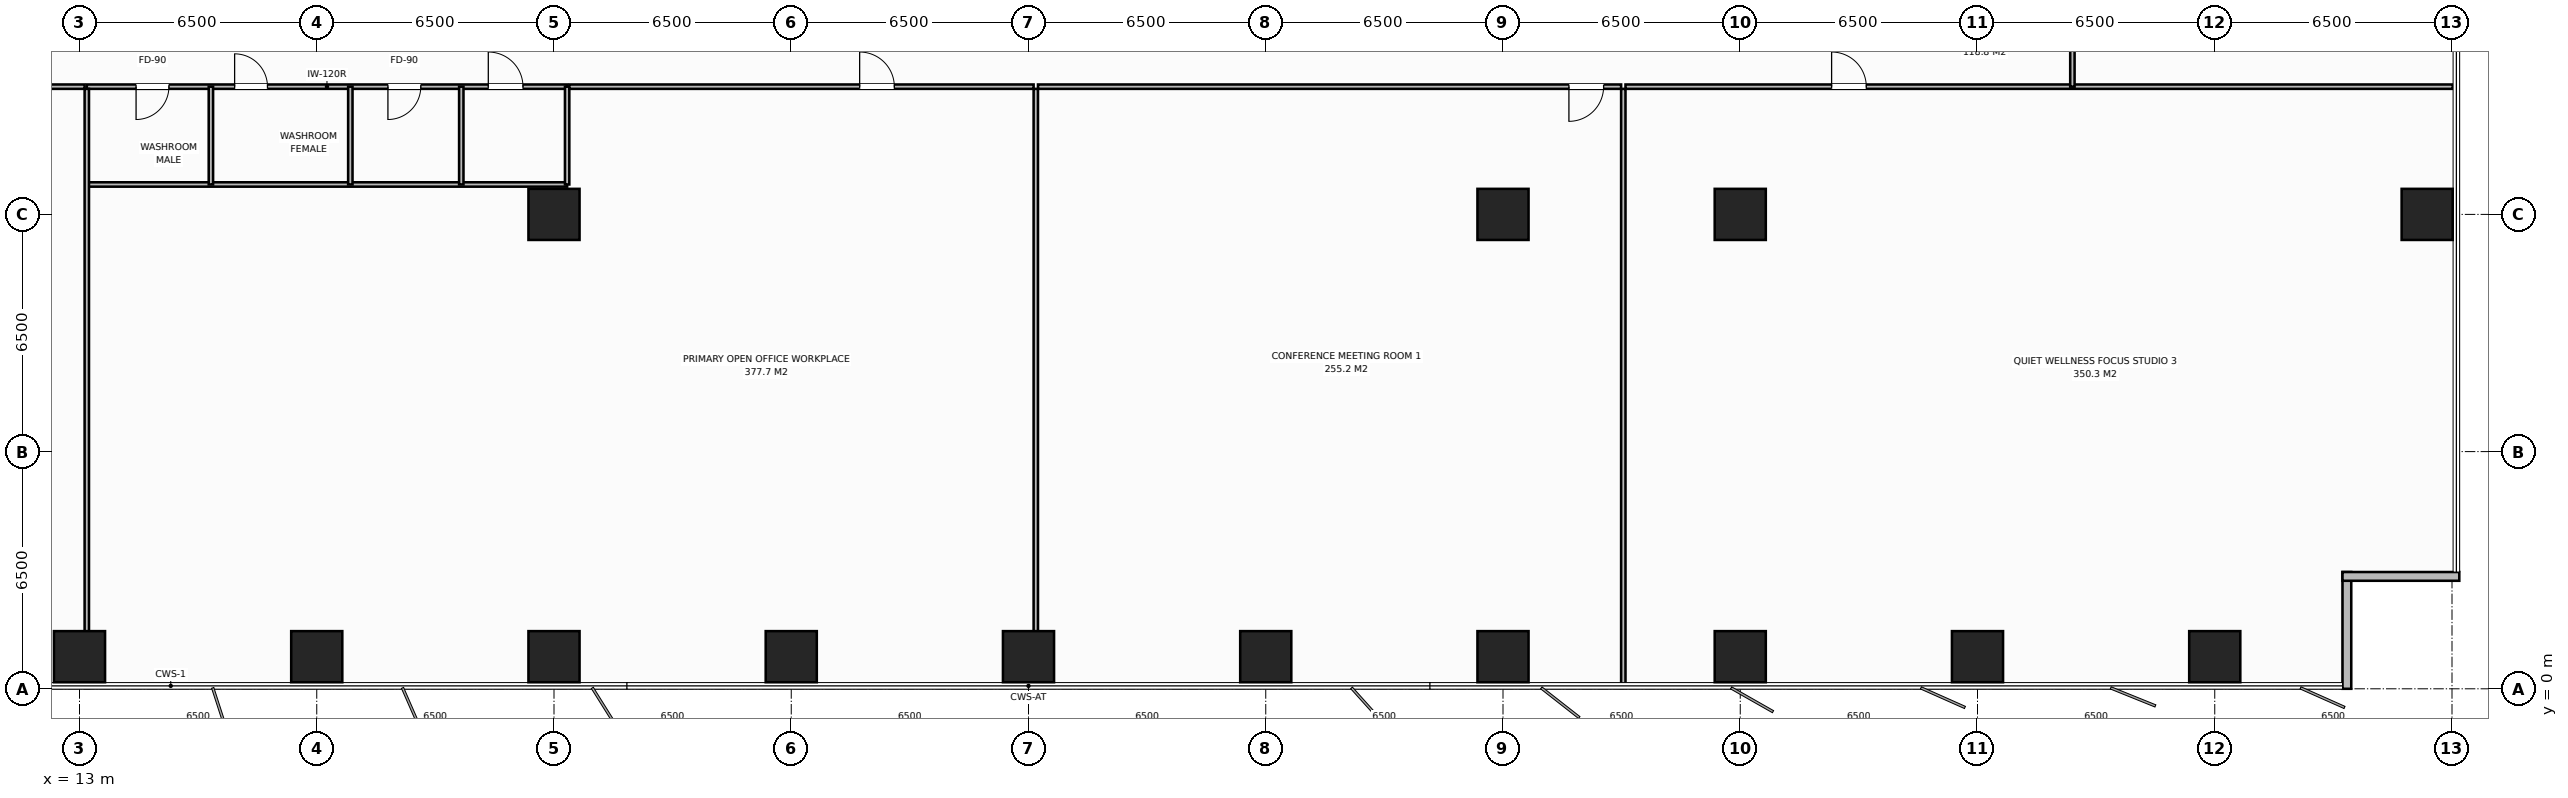
"""IFC4 building model, lengths in metres.
Left out: names, types, materials, properties, quantities, classifications, styles, units other than length and angle.
Written with IfcOpenShell. Run it as: python <this file> out.ifc"""

import sys

from ifc_helpers import new_model, si_unit, direction, frame, frame_2d, origin, origin_2d, place, context, subcontext, project, spatial, rectangle, extrude, element, fill, save


model = new_model("IFC4")
c1 = context("Model", 3, precision=1e-05, world=origin(), true_north=direction((0.0, 1.0)))
c2 = subcontext(c1, "Body", "Model", "MODEL_VIEW")
j1 = project(units=[si_unit("LENGTHUNIT", "METRE"), si_unit("PLANEANGLEUNIT", "RADIAN")], contexts=[c1])
p1 = place(None, origin())
s1 = spatial("IfcSite", under=j1, at=p1, CompositionType="ELEMENT")
p2 = place(p1, origin())
s2 = spatial("IfcBuilding", under=s1, at=p2, CompositionType="ELEMENT")
p3 = place(p2, frame((0.0, 0.0, 39.2)))
s3 = spatial("IfcBuildingStorey", under=s2, at=p3, CompositionType="ELEMENT", Elevation=39.2)
for number, where, z_axis, x_axis in (
    (1, (58.5, 13.0, 0.0), (0.0, 0.0, 1.0), (1.0, 0.0, 0.0)),
    (2, (26.0, 13.0, 0.0), (0.0, 0.0, 1.0), (1.0, 0.0, 0.0)),
    (3, (52.0, 13.0, 0.0), (0.0, 0.0, 1.0), (1.0, 0.0, 0.0)),
    (4, (13.0, 0.88, 0.0), (0.0, 0.0, 1.0), (1.0, 0.0, 0.0)),
    (5, (19.5, 0.88, 0.0), (0.0, 0.0, 1.0), (1.0, 0.0, 0.0)),
    (6, (26.0, 0.88, 0.0), (0.0, 0.0, 1.0), (1.0, 0.0, 0.0)),
    (7, (32.5, 0.88, 0.0), (0.0, 0.0, 1.0), (1.0, 0.0, 0.0)),
    (8, (39.0, 0.88, 0.0), (0.0, 0.0, 1.0), (1.0, 0.0, 0.0)),
    (9, (45.5, 0.88, 0.0), (0.0, 0.0, 1.0), (1.0, 0.0, 0.0)),
    (10, (52.0, 0.88, 0.0), (0.0, 0.0, 1.0), (1.0, 0.0, 0.0)),
    (11, (58.5, 0.88, 0.0), (0.0, 0.0, 1.0), (1.0, 0.0, 0.0)),
    (12, (65.0, 0.88, 0.0), (0.0, 0.0, 1.0), (1.0, 0.0, 0.0)),
    (13, (71.5, 0.88, 0.0), (0.0, 0.0, 1.0), (1.0, 0.0, 0.0)),
    (14, (77.32, 13.0, 0.0), (0.0, 0.0, 1.0), (1.0, 0.0, 0.0)),
):
    element("IfcColumn", number, at=place(p3, frame(where, z_axis=z_axis, x_axis=x_axis)), inside=s3, PredefinedType="COLUMN", context=c2, shape_type="SweptSolid", body=[
        extrude(rectangle(XDim=1.4, YDim=1.4, at=origin_2d()), origin(), (0.0, 0.0, 1.0), 3.8),
    ])
for number, where, z_axis, x_axis in (
    (15, (75.12, 3.2, 0.0), (0.0, 0.0, 1.0), (0.0, -1.0, 0.0)),
    (16, (78.2, 3.08, 0.0), (0.0, 0.0, 1.0), (-1.0, 0.0, 0.0)),
):
    element("IfcWall", number, at=place(p3, frame(where, z_axis=z_axis, x_axis=x_axis)), inside=s3, PredefinedType="STANDARD", context=c2, shape_type="SweptSolid", body=[
        extrude(rectangle(XDim=3.2, YDim=0.24, at=frame_2d((1.6, 0.0))), origin(), (0.0, 0.0, 1.0), 3.55),
    ])
p4 = place(p3, frame((13.2, 16.5, 0.0), z_axis=(0.0, 0.0, 1.0), x_axis=(1.0, 0.0, 0.0)))
e17 = element("IfcWall", 17, at=p4, inside=s3, PredefinedType="PARTITIONING", context=c2, shape_type="SweptSolid", body=[
    extrude(rectangle(XDim=13.16, YDim=0.12, at=frame_2d((6.58, 0.0))), origin(), (0.0, 0.0, 1.0), 3.55),
])
p5 = place(p4, frame((1.35, 0.0, 0.0)))
e18 = element("IfcOpeningElement", 18, at=p5, cuts=e17, PredefinedType="OPENING", context=c2, shape_type="SweptSolid", body=[
    extrude(rectangle(XDim=0.9, YDim=2.15, at=frame_2d((0.45, 1.075))), frame((0.0, 0.07, 0.0), z_axis=(0.0, -1.0, 0.0), x_axis=(1.0, 0.0, 0.0)), (0.0, 0.0, 1.0), 0.14),
])
p6 = place(p4, frame((4.05, 0.0, 0.0)))
e19 = element("IfcOpeningElement", 19, at=p6, cuts=e17, PredefinedType="OPENING", context=c2, shape_type="SweptSolid", body=[
    extrude(rectangle(XDim=0.9, YDim=2.15, at=frame_2d((0.45, 1.075))), frame((0.0, 0.07, 0.0), z_axis=(0.0, -1.0, 0.0), x_axis=(1.0, 0.0, 0.0)), (0.0, 0.0, 1.0), 0.14),
])
p7 = place(p4, frame((8.25, 0.0, 0.0)))
e20 = element("IfcOpeningElement", 20, at=p7, cuts=e17, PredefinedType="OPENING", context=c2, shape_type="SweptSolid", body=[
    extrude(rectangle(XDim=0.9, YDim=2.15, at=frame_2d((0.45, 1.075))), frame((0.0, 0.07, 0.0), z_axis=(0.0, -1.0, 0.0), x_axis=(1.0, 0.0, 0.0)), (0.0, 0.0, 1.0), 0.14),
])
p8 = place(p4, frame((11.0, 0.0, 0.0)))
e21 = element("IfcOpeningElement", 21, at=p8, cuts=e17, PredefinedType="OPENING", context=c2, shape_type="SweptSolid", body=[
    extrude(rectangle(XDim=0.95, YDim=2.15, at=frame_2d((0.475, 1.075))), frame((0.0, 0.07, 0.0), z_axis=(0.0, -1.0, 0.0), x_axis=(1.0, 0.0, 0.0)), (0.0, 0.0, 1.0), 0.14),
])
p9 = place(p3, frame((13.2, 13.82, 0.0), z_axis=(0.0, 0.0, 1.0), x_axis=(1.0, 0.0, 0.0)))
e22 = element("IfcWall", 22, at=p9, inside=s3, PredefinedType="PARTITIONING", context=c2, shape_type="SweptSolid", body=[
    extrude(rectangle(XDim=13.16, YDim=0.12, at=frame_2d((6.58, 0.0))), origin(), (0.0, 0.0, 1.0), 3.55),
])
for number, where, z_axis, x_axis in (
    (23, (16.6, 13.82, 0.0), (0.0, 0.0, 1.0), (0.0, 1.0, 0.0)),
    (24, (20.42, 13.82, 0.0), (0.0, 0.0, 1.0), (0.0, 1.0, 0.0)),
    (25, (23.46, 13.82, 0.0), (0.0, 0.0, 1.0), (0.0, 1.0, 0.0)),
    (26, (26.36, 13.82, 0.0), (0.0, 0.0, 1.0), (0.0, 1.0, 0.0)),
):
    element("IfcWall", number, at=place(p3, frame(where, z_axis=z_axis, x_axis=x_axis)), inside=s3, PredefinedType="PARTITIONING", context=c2, shape_type="SweptSolid", body=[
        extrude(rectangle(XDim=2.68, YDim=0.12, at=frame_2d((1.34, 0.0))), origin(), (0.0, 0.0, 1.0), 3.55),
    ])
p10 = place(p3, frame((13.2, 0.02, 0.0), z_axis=(0.0, 0.0, 1.0), x_axis=(0.0, 1.0, 0.0)))
e27 = element("IfcWall", 27, at=p10, inside=s3, PredefinedType="PARTITIONING", context=c2, shape_type="SweptSolid", body=[
    extrude(rectangle(XDim=16.42, YDim=0.12, at=frame_2d((8.21, 0.0))), origin(), (0.0, 0.0, 1.0), 2.9),
])
p11 = place(p3, frame((-0.02, 16.5, 0.0), z_axis=(0.0, 0.0, 1.0), x_axis=(1.0, 0.0, 0.0)))
e28 = element("IfcWall", 28, at=p11, inside=s3, PredefinedType="PARTITIONING", context=c2, shape_type="SweptSolid", body=[
    extrude(rectangle(XDim=13.16, YDim=0.12, at=frame_2d((6.58, 0.0))), origin(), (0.0, 0.0, 1.0), 3.55),
])
p12 = place(p11, frame((10.9, 0.0, 0.0)))
e29 = element("IfcOpeningElement", 29, at=p12, cuts=e28, PredefinedType="OPENING", context=c2, shape_type="SweptSolid", body=[
    extrude(rectangle(XDim=0.95, YDim=2.15, at=frame_2d((0.475, 1.075))), frame((0.0, 0.07, 0.0), z_axis=(0.0, -1.0, 0.0), x_axis=(1.0, 0.0, 0.0)), (0.0, 0.0, 1.0), 0.14),
])
p13 = place(p3, frame((39.2, 0.02, 0.0), z_axis=(0.0, 0.0, 1.0), x_axis=(0.0, 1.0, 0.0)))
e30 = element("IfcWall", 30, at=p13, inside=s3, PredefinedType="PARTITIONING", context=c2, shape_type="SweptSolid", body=[
    extrude(rectangle(XDim=16.42, YDim=0.12, at=frame_2d((8.21, 0.0))), origin(), (0.0, 0.0, 1.0), 2.9),
])
p14 = place(p3, frame((26.42, 16.5, 0.0), z_axis=(0.0, 0.0, 1.0), x_axis=(1.0, 0.0, 0.0)))
e31 = element("IfcWall", 31, at=p14, inside=s3, PredefinedType="PARTITIONING", context=c2, shape_type="SweptSolid", body=[
    extrude(rectangle(XDim=12.72, YDim=0.12, at=frame_2d((6.36, 0.0))), origin(), (0.0, 0.0, 1.0), 3.55),
])
p15 = place(p14, frame((7.954, 0.0, 0.0)))
e32 = element("IfcOpeningElement", 32, at=p15, cuts=e31, PredefinedType="OPENING", context=c2, shape_type="SweptSolid", body=[
    extrude(rectangle(XDim=0.95, YDim=2.15, at=frame_2d((0.475, 1.075))), frame((0.0, 0.07, 0.0), z_axis=(0.0, -1.0, 0.0), x_axis=(1.0, 0.0, 0.0)), (0.0, 0.0, 1.0), 0.14),
])
p16 = place(p3, frame((55.296, 0.02, 0.0), z_axis=(0.0, 0.0, 1.0), x_axis=(0.0, 1.0, 0.0)))
e33 = element("IfcWall", 33, at=p16, inside=s3, PredefinedType="PARTITIONING", context=c2, shape_type="SweptSolid", body=[
    extrude(rectangle(XDim=16.42, YDim=0.12, at=frame_2d((8.21, 0.0))), origin(), (0.0, 0.0, 1.0), 3.55),
])
p17 = place(p3, frame((39.26, 16.5, 0.0), z_axis=(0.0, 0.0, 1.0), x_axis=(1.0, 0.0, 0.0)))
e34 = element("IfcWall", 34, at=p17, inside=s3, PredefinedType="PARTITIONING", context=c2, shape_type="SweptSolid", body=[
    extrude(rectangle(XDim=15.976, YDim=0.12, at=frame_2d((7.988, 0.0))), origin(), (0.0, 0.0, 1.0), 3.55),
])
p18 = place(p17, frame((14.546, 0.0, 0.0)))
e35 = element("IfcOpeningElement", 35, at=p18, cuts=e34, PredefinedType="OPENING", context=c2, shape_type="SweptSolid", body=[
    extrude(rectangle(XDim=0.95, YDim=2.15, at=frame_2d((0.475, 1.075))), frame((0.0, 0.07, 0.0), z_axis=(0.0, -1.0, 0.0), x_axis=(1.0, 0.0, 0.0)), (0.0, 0.0, 1.0), 0.14),
])
p19 = place(p3, frame((55.356, 16.5, 0.0), z_axis=(0.0, 0.0, 1.0), x_axis=(1.0, 0.0, 0.0)))
e36 = element("IfcWall", 36, at=p19, inside=s3, PredefinedType="PARTITIONING", context=c2, shape_type="SweptSolid", body=[
    extrude(rectangle(XDim=22.664, YDim=0.12, at=frame_2d((11.332, 0.0))), origin(), (0.0, 0.0, 1.0), 3.55),
])
p20 = place(p19, frame((5.647, 0.0, 0.0)))
e37 = element("IfcOpeningElement", 37, at=p20, cuts=e36, PredefinedType="OPENING", context=c2, shape_type="SweptSolid", body=[
    extrude(rectangle(XDim=0.95, YDim=2.15, at=frame_2d((0.475, 1.075))), frame((0.0, 0.07, 0.0), z_axis=(0.0, -1.0, 0.0), x_axis=(1.0, 0.0, 0.0)), (0.0, 0.0, 1.0), 0.14),
])
p21 = place(p3, frame((67.6, 16.5, 0.0), z_axis=(0.0, 0.0, 1.0), x_axis=(0.0, 1.0, 0.0)))
e38 = element("IfcWall", 38, at=p21, inside=s3, PredefinedType="PARTITIONING", context=c2, shape_type="SweptSolid", body=[
    extrude(rectangle(XDim=19.0, YDim=0.12, at=frame_2d((9.5, 0.0))), origin(), (0.0, 0.0, 1.0), 3.55),
])
p22 = place(p21, frame((9.025, 0.0, 0.0)))
e39 = element("IfcOpeningElement", 39, at=p22, cuts=e38, PredefinedType="OPENING", context=c2, shape_type="SweptSolid", body=[
    extrude(rectangle(XDim=0.95, YDim=2.15, at=frame_2d((0.475, 1.075))), frame((0.0, 0.07, 0.0), z_axis=(0.0, -1.0, 0.0), x_axis=(1.0, 0.0, 0.0)), (0.0, 0.0, 1.0), 0.14),
])
p23 = place(p5, origin())
e40 = element("IfcDoor", 40, at=p23, inside=s3, OperationType="SINGLE_SWING_RIGHT", PredefinedType="DOOR", context=c2, shape_type="SweptSolid", body=[
    extrude(rectangle(XDim=0.9, YDim=2.15, at=frame_2d((0.45, 1.075))), frame((0.0, 0.025, 0.0), z_axis=(0.0, -1.0, 0.0), x_axis=(1.0, 0.0, 0.0)), (0.0, 0.0, 1.0), 0.05),
])
fill(e18, e40)
p24 = place(p6, origin())
e41 = element("IfcDoor", 41, at=p24, inside=s3, OperationType="SINGLE_SWING_LEFT", PredefinedType="DOOR", context=c2, shape_type="SweptSolid", body=[
    extrude(rectangle(XDim=0.9, YDim=2.15, at=frame_2d((0.45, 1.075))), frame((0.0, 0.025, 0.0), z_axis=(0.0, -1.0, 0.0), x_axis=(1.0, 0.0, 0.0)), (0.0, 0.0, 1.0), 0.05),
])
fill(e19, e41)
p25 = place(p7, origin())
e42 = element("IfcDoor", 42, at=p25, inside=s3, OperationType="SINGLE_SWING_RIGHT", PredefinedType="DOOR", context=c2, shape_type="SweptSolid", body=[
    extrude(rectangle(XDim=0.9, YDim=2.15, at=frame_2d((0.45, 1.075))), frame((0.0, 0.025, 0.0), z_axis=(0.0, -1.0, 0.0), x_axis=(1.0, 0.0, 0.0)), (0.0, 0.0, 1.0), 0.05),
])
fill(e20, e42)
p26 = place(p8, origin())
e43 = element("IfcDoor", 43, at=p26, inside=s3, OperationType="SINGLE_SWING_LEFT", PredefinedType="DOOR", context=c2, shape_type="SweptSolid", body=[
    extrude(rectangle(XDim=0.95, YDim=2.15, at=frame_2d((0.475, 1.075))), frame((0.0, 0.025, 0.0), z_axis=(0.0, -1.0, 0.0), x_axis=(1.0, 0.0, 0.0)), (0.0, 0.0, 1.0), 0.05),
])
fill(e21, e43)
p27 = place(p15, origin())
e44 = element("IfcDoor", 44, at=p27, inside=s3, OperationType="SINGLE_SWING_LEFT", PredefinedType="DOOR", context=c2, shape_type="SweptSolid", body=[
    extrude(rectangle(XDim=0.95, YDim=2.15, at=frame_2d((0.475, 1.075))), frame((0.0, 0.025, 0.0), z_axis=(0.0, -1.0, 0.0), x_axis=(1.0, 0.0, 0.0)), (0.0, 0.0, 1.0), 0.05),
])
fill(e32, e44)
p28 = place(p18, origin())
e45 = element("IfcDoor", 45, at=p28, inside=s3, OperationType="SINGLE_SWING_RIGHT", PredefinedType="DOOR", context=c2, shape_type="SweptSolid", body=[
    extrude(rectangle(XDim=0.95, YDim=2.15, at=frame_2d((0.475, 1.075))), frame((0.0, 0.025, 0.0), z_axis=(0.0, -1.0, 0.0), x_axis=(1.0, 0.0, 0.0)), (0.0, 0.0, 1.0), 0.05),
])
fill(e35, e45)
p29 = place(p20, origin())
e46 = element("IfcDoor", 46, at=p29, inside=s3, OperationType="SINGLE_SWING_LEFT", PredefinedType="DOOR", context=c2, shape_type="SweptSolid", body=[
    extrude(rectangle(XDim=0.95, YDim=2.15, at=frame_2d((0.475, 1.075))), frame((0.0, 0.025, 0.0), z_axis=(0.0, -1.0, 0.0), x_axis=(1.0, 0.0, 0.0)), (0.0, 0.0, 1.0), 0.05),
])
fill(e37, e46)
save(model, sys.argv[1])
